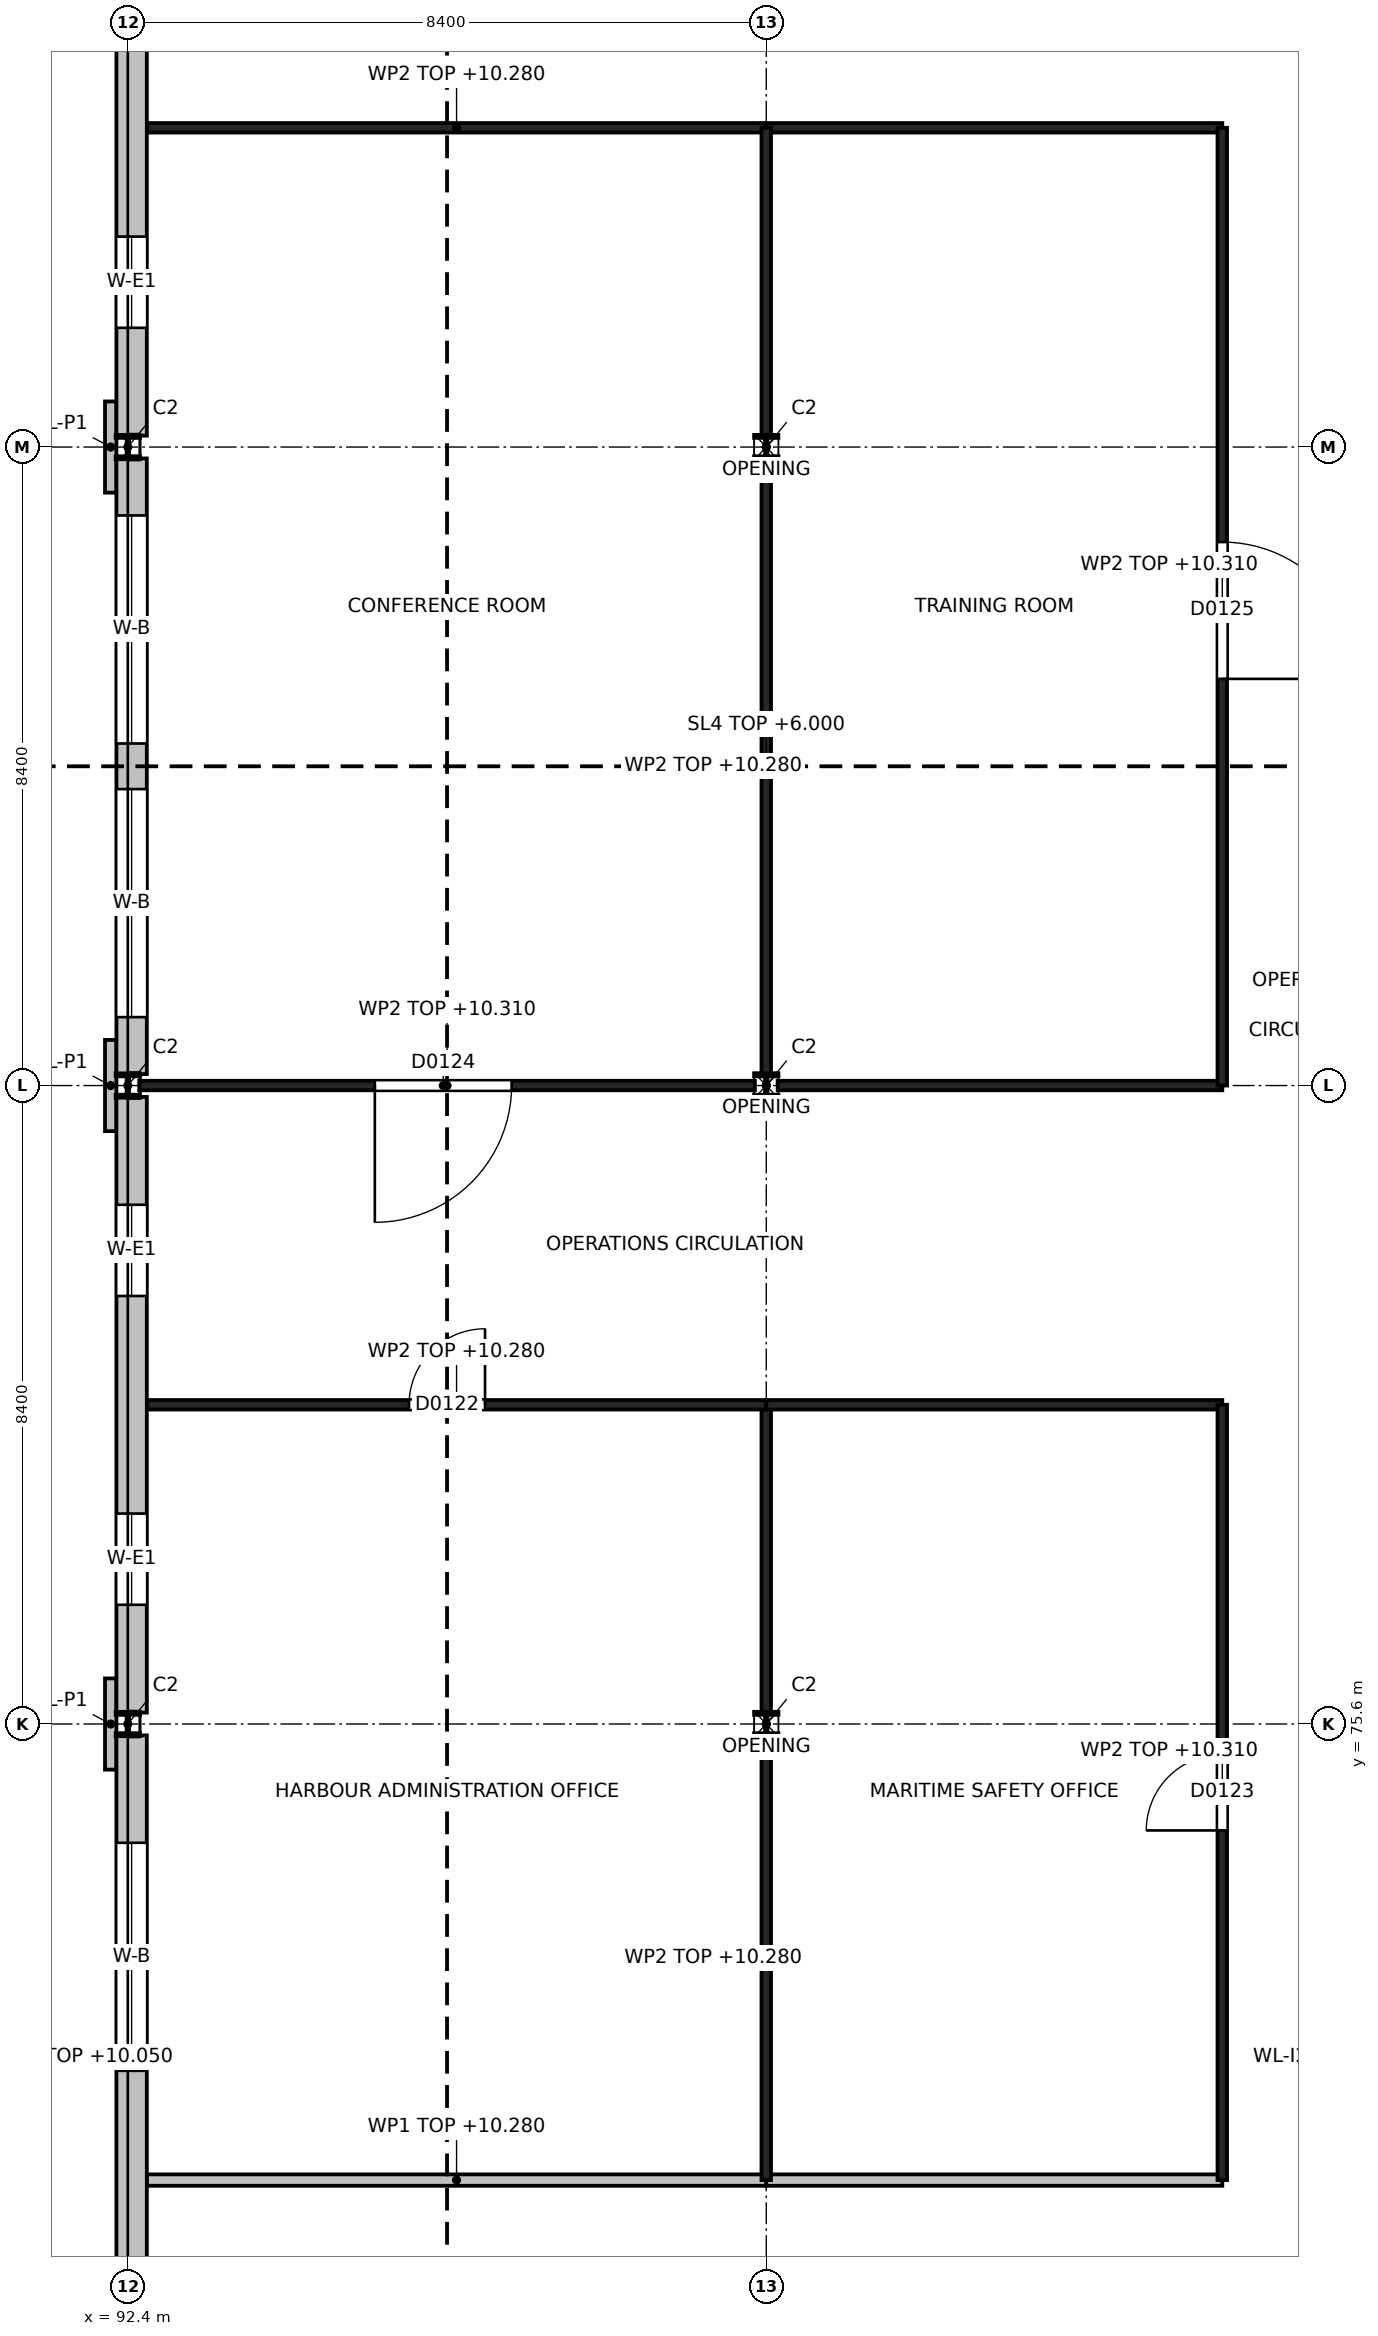
"""IFC4 building model, lengths in metres.
Left out: names, types, materials, properties, quantities, classifications, styles, units other than length and angle.
Written with IfcOpenShell. Run it as: python <this file> out.ifc"""

import sys

from ifc_helpers import new_model, si_unit, direction, frame, frame_2d, origin, origin_2d, place, context, subcontext, project, spatial, rectangle, i_section, extrude, element, fill, save


model = new_model("IFC4")
c1 = context("Model", 3, precision=1e-05, world=origin(), true_north=direction((0.0, 1.0)))
c2 = subcontext(c1, "Body", "Model", "MODEL_VIEW")
j1 = project(units=[si_unit("LENGTHUNIT", "METRE"), si_unit("PLANEANGLEUNIT", "RADIAN")], contexts=[c1])
p1 = place(None, origin())
s1 = spatial("IfcSite", under=j1, at=p1, CompositionType="ELEMENT")
p2 = place(p1, origin())
s2 = spatial("IfcBuilding", under=s1, at=p2, CompositionType="ELEMENT")
p3 = place(p2, frame((0.0, 0.0, 6.0)))
s3 = spatial("IfcBuildingStorey", under=s2, at=p3, CompositionType="ELEMENT", Elevation=6.0)
for number, where, z_axis, x_axis in (
    (1, (92.4, 75.6, 0.0), (0.0, 0.0, 1.0), (1.0, 0.0, 0.0)),
    (2, (92.4, 84.0, 0.0), (0.0, 0.0, 1.0), (1.0, 0.0, 0.0)),
    (3, (92.4, 92.4, 0.0), (0.0, 0.0, 1.0), (1.0, 0.0, 0.0)),
    (4, (100.8, 75.6, 0.0), (0.0, 0.0, 1.0), (1.0, 0.0, 0.0)),
    (5, (100.8, 84.0, 0.0), (0.0, 0.0, 1.0), (1.0, 0.0, 0.0)),
    (6, (100.8, 92.4, 0.0), (0.0, 0.0, 1.0), (1.0, 0.0, 0.0)),
):
    element("IfcColumn", number, at=place(p3, frame(where, z_axis=z_axis, x_axis=x_axis)), inside=s3, PredefinedType="COLUMN", context=c2, shape_type="SweptSolid", body=[
        extrude(i_section(OverallWidth=0.3, OverallDepth=0.3, WebThickness=0.011, FlangeThickness=0.019, at=origin_2d()), origin(), (0.0, 0.0, 1.0), 4.8),
    ])
p4 = place(p3, frame((92.45, 67.0, 0.0), z_axis=(0.0, 0.0, 1.0), x_axis=(0.0, 1.0, 0.0)))
e7 = element("IfcWall", 7, at=p4, inside=s3, PredefinedType="SOLIDWALL", context=c2, shape_type="SweptSolid", body=[
    extrude(rectangle(XDim=8.45, YDim=0.4, at=frame_2d((4.225, 0.0))), origin(), (0.0, 0.0, 1.0), 4.05),
])
p5 = place(p4, frame((4.038, 0.0, 0.9)))
e8 = element("IfcOpeningElement", 8, at=p5, cuts=e7, PredefinedType="OPENING", context=c2, shape_type="SweptSolid", body=[
    extrude(rectangle(XDim=3.0, YDim=3.0, at=frame_2d((1.5, 1.5))), frame((0.0, 0.2, 0.0), z_axis=(0.0, -1.0, 0.0), x_axis=(1.0, 0.0, 0.0)), (0.0, 0.0, 1.0), 0.4),
])
p6 = place(p3, frame((92.45, 75.75, 0.0), z_axis=(0.0, 0.0, 1.0), x_axis=(0.0, 1.0, 0.0)))
e9 = element("IfcWall", 9, at=p6, inside=s3, PredefinedType="SOLIDWALL", context=c2, shape_type="SweptSolid", body=[
    extrude(rectangle(XDim=8.1, YDim=0.4, at=frame_2d((4.05, 0.0))), origin(), (0.0, 0.0, 1.0), 4.05),
])
p7 = place(p6, frame((1.419, 0.0, 0.9)))
e10 = element("IfcOpeningElement", 10, at=p7, cuts=e9, PredefinedType="OPENING", context=c2, shape_type="SweptSolid", body=[
    extrude(rectangle(XDim=1.2, YDim=3.0, at=frame_2d((0.6, 1.5))), frame((0.0, 0.2, 0.0), z_axis=(0.0, -1.0, 0.0), x_axis=(1.0, 0.0, 0.0)), (0.0, 0.0, 1.0), 0.4),
])
p8 = place(p6, frame((5.481, 0.0, 0.9)))
e11 = element("IfcOpeningElement", 11, at=p8, cuts=e9, PredefinedType="OPENING", context=c2, shape_type="SweptSolid", body=[
    extrude(rectangle(XDim=1.2, YDim=3.0, at=frame_2d((0.6, 1.5))), frame((0.0, 0.2, 0.0), z_axis=(0.0, -1.0, 0.0), x_axis=(1.0, 0.0, 0.0)), (0.0, 0.0, 1.0), 0.4),
])
p9 = place(p3, frame((92.45, 84.15, 0.0), z_axis=(0.0, 0.0, 1.0), x_axis=(0.0, 1.0, 0.0)))
e12 = element("IfcWall", 12, at=p9, inside=s3, PredefinedType="SOLIDWALL", context=c2, shape_type="SweptSolid", body=[
    extrude(rectangle(XDim=8.1, YDim=0.4, at=frame_2d((4.05, 0.0))), origin(), (0.0, 0.0, 1.0), 4.05),
])
p10 = place(p9, frame((0.75, 0.0, 0.9)))
e13 = element("IfcOpeningElement", 13, at=p10, cuts=e12, PredefinedType="OPENING", context=c2, shape_type="SweptSolid", body=[
    extrude(rectangle(XDim=3.0, YDim=3.0, at=frame_2d((1.5, 1.5))), frame((0.0, 0.2, 0.0), z_axis=(0.0, -1.0, 0.0), x_axis=(1.0, 0.0, 0.0)), (0.0, 0.0, 1.0), 0.4),
])
p11 = place(p9, frame((4.35, 0.0, 0.9)))
e14 = element("IfcOpeningElement", 14, at=p11, cuts=e12, PredefinedType="OPENING", context=c2, shape_type="SweptSolid", body=[
    extrude(rectangle(XDim=3.0, YDim=3.0, at=frame_2d((1.5, 1.5))), frame((0.0, 0.2, 0.0), z_axis=(0.0, -1.0, 0.0), x_axis=(1.0, 0.0, 0.0)), (0.0, 0.0, 1.0), 0.4),
])
p12 = place(p3, frame((92.45, 92.55, 0.0), z_axis=(0.0, 0.0, 1.0), x_axis=(0.0, 1.0, 0.0)))
e15 = element("IfcWall", 15, at=p12, inside=s3, PredefinedType="SOLIDWALL", context=c2, shape_type="SweptSolid", body=[
    extrude(rectangle(XDim=8.45, YDim=0.4, at=frame_2d((4.225, 0.0))), origin(), (0.0, 0.0, 1.0), 4.05),
])
p13 = place(p12, frame((1.419, 0.0, 0.9)))
e16 = element("IfcOpeningElement", 16, at=p13, cuts=e15, PredefinedType="OPENING", context=c2, shape_type="SweptSolid", body=[
    extrude(rectangle(XDim=1.2, YDim=3.0, at=frame_2d((0.6, 1.5))), frame((0.0, 0.2, 0.0), z_axis=(0.0, -1.0, 0.0), x_axis=(1.0, 0.0, 0.0)), (0.0, 0.0, 1.0), 0.4),
])
p14 = place(p12, frame((5.481, 0.0, 0.9)))
e17 = element("IfcOpeningElement", 17, at=p14, cuts=e15, PredefinedType="OPENING", context=c2, shape_type="SweptSolid", body=[
    extrude(rectangle(XDim=1.2, YDim=3.0, at=frame_2d((0.6, 1.5))), frame((0.0, 0.2, 0.0), z_axis=(0.0, -1.0, 0.0), x_axis=(1.0, 0.0, 0.0)), (0.0, 0.0, 1.0), 0.4),
])
p15 = place(p3, frame((92.175, 75.0, 0.0), z_axis=(0.0, 0.0, 1.0), x_axis=(0.0, 1.0, 0.0)))
e18 = element("IfcWall", 18, at=p15, inside=s3, PredefinedType="SOLIDWALL", context=c2, shape_type="SweptSolid", body=[
    extrude(rectangle(XDim=1.2, YDim=0.15, at=frame_2d((0.6, 0.0))), origin(), (0.0, 0.0, 1.0), 4.8),
])
p16 = place(p3, frame((92.175, 83.4, 0.0), z_axis=(0.0, 0.0, 1.0), x_axis=(0.0, 1.0, 0.0)))
e19 = element("IfcWall", 19, at=p16, inside=s3, PredefinedType="SOLIDWALL", context=c2, shape_type="SweptSolid", body=[
    extrude(rectangle(XDim=1.2, YDim=0.15, at=frame_2d((0.6, 0.0))), origin(), (0.0, 0.0, 1.0), 4.8),
])
p17 = place(p3, frame((92.175, 91.8, 0.0), z_axis=(0.0, 0.0, 1.0), x_axis=(0.0, 1.0, 0.0)))
e20 = element("IfcWall", 20, at=p17, inside=s3, PredefinedType="SOLIDWALL", context=c2, shape_type="SweptSolid", body=[
    extrude(rectangle(XDim=1.2, YDim=0.15, at=frame_2d((0.6, 0.0))), origin(), (0.0, 0.0, 1.0), 4.8),
])
p18 = place(p3, frame((92.65, 69.6, 0.0), z_axis=(0.0, 0.0, 1.0), x_axis=(1.0, 0.0, 0.0)))
e21 = element("IfcWall", 21, at=p18, inside=s3, PredefinedType="PARTITIONING", context=c2, shape_type="SweptSolid", body=[
    extrude(rectangle(XDim=8.15, YDim=0.15, at=frame_2d((4.075, 0.0))), origin(), (0.0, 0.0, 1.0), 4.28),
])
p19 = place(p3, frame((100.8, 69.6, 0.0), z_axis=(0.0, 0.0, 1.0), x_axis=(1.0, 0.0, 0.0)))
e22 = element("IfcWall", 22, at=p19, inside=s3, PredefinedType="PARTITIONING", context=c2, shape_type="SweptSolid", body=[
    extrude(rectangle(XDim=6.0, YDim=0.15, at=frame_2d((3.0, 0.0))), origin(), (0.0, 0.0, 1.0), 4.28),
])
p20 = place(p3, frame((100.8, 69.6, 0.0), z_axis=(0.0, 0.0, 1.0), x_axis=(0.0, 1.0, 0.0)))
e23 = element("IfcWall", 23, at=p20, inside=s3, PredefinedType="PARTITIONING", context=c2, shape_type="SweptSolid", body=[
    extrude(rectangle(XDim=5.85, YDim=0.125, at=frame_2d((2.925, 0.0))), origin(), (0.0, 0.0, 1.0), 4.28),
])
p21 = place(p3, frame((100.8, 75.75, 0.0), z_axis=(0.0, 0.0, 1.0), x_axis=(0.0, 1.0, 0.0)))
e24 = element("IfcWall", 24, at=p21, inside=s3, PredefinedType="PARTITIONING", context=c2, shape_type="SweptSolid", body=[
    extrude(rectangle(XDim=4.05, YDim=0.125, at=frame_2d((2.025, 0.0))), origin(), (0.0, 0.0, 1.0), 4.28),
])
p22 = place(p3, frame((92.65, 79.8, 0.0), z_axis=(0.0, 0.0, 1.0), x_axis=(1.0, 0.0, 0.0)))
e25 = element("IfcWall", 25, at=p22, inside=s3, PredefinedType="PARTITIONING", context=c2, shape_type="SweptSolid", body=[
    extrude(rectangle(XDim=8.15, YDim=0.125, at=frame_2d((4.075, 0.0))), origin(), (0.0, 0.0, 1.0), 4.28),
])
p23 = place(p22, frame((3.449, 0.0, 0.0)))
e26 = element("IfcOpeningElement", 26, at=p23, cuts=e25, PredefinedType="OPENING", context=c2, shape_type="SweptSolid", body=[
    extrude(rectangle(XDim=1.0, YDim=2.2, at=frame_2d((0.5, 1.1))), frame((0.0, 0.062, 0.0), z_axis=(0.0, -1.0, 0.0), x_axis=(1.0, 0.0, 0.0)), (0.0, 0.0, 1.0), 0.125),
])
p24 = place(p3, frame((100.8, 79.8, 0.0), z_axis=(0.0, 0.0, 1.0), x_axis=(1.0, 0.0, 0.0)))
e27 = element("IfcWall", 27, at=p24, inside=s3, PredefinedType="PARTITIONING", context=c2, shape_type="SweptSolid", body=[
    extrude(rectangle(XDim=6.0, YDim=0.125, at=frame_2d((3.0, 0.0))), origin(), (0.0, 0.0, 1.0), 4.28),
])
p25 = place(p3, frame((106.8, 69.6, 0.0), z_axis=(0.0, 0.0, 1.0), x_axis=(0.0, 1.0, 0.0)))
e28 = element("IfcWall", 28, at=p25, inside=s3, PredefinedType="PARTITIONING", context=c2, shape_type="SweptSolid", body=[
    extrude(rectangle(XDim=10.2, YDim=0.125, at=frame_2d((5.1, 0.0))), origin(), (0.0, 0.0, 1.0), 4.31),
])
p26 = place(p25, frame((4.6, 0.0, 0.0)))
e29 = element("IfcOpeningElement", 29, at=p26, cuts=e28, PredefinedType="OPENING", context=c2, shape_type="SweptSolid", body=[
    extrude(rectangle(XDim=1.0, YDim=2.2, at=frame_2d((0.5, 1.1))), frame((0.0, 0.062, 0.0), z_axis=(0.0, -1.0, 0.0), x_axis=(1.0, 0.0, 0.0)), (0.0, 0.0, 1.0), 0.125),
])
p27 = place(p3, frame((92.55, 84.0, 0.0), z_axis=(0.0, 0.0, 1.0), x_axis=(1.0, 0.0, 0.0)))
e30 = element("IfcWall", 30, at=p27, inside=s3, PredefinedType="PARTITIONING", context=c2, shape_type="SweptSolid", body=[
    extrude(rectangle(XDim=8.1, YDim=0.125, at=frame_2d((4.05, 0.0))), origin(), (0.0, 0.0, 1.0), 4.31),
])
p28 = place(p27, frame((3.1, 0.0, 0.0)))
e31 = element("IfcOpeningElement", 31, at=p28, cuts=e30, PredefinedType="OPENING", context=c2, shape_type="SweptSolid", body=[
    extrude(rectangle(XDim=1.8, YDim=2.1, at=frame_2d((0.9, 1.05))), frame((0.0, 0.062, 0.0), z_axis=(0.0, -1.0, 0.0), x_axis=(1.0, 0.0, 0.0)), (0.0, 0.0, 1.0), 0.125),
])
p29 = place(p3, frame((92.65, 96.6, 0.0), z_axis=(0.0, 0.0, 1.0), x_axis=(1.0, 0.0, 0.0)))
e32 = element("IfcWall", 32, at=p29, inside=s3, PredefinedType="PARTITIONING", context=c2, shape_type="SweptSolid", body=[
    extrude(rectangle(XDim=8.15, YDim=0.125, at=frame_2d((4.075, 0.0))), origin(), (0.0, 0.0, 1.0), 4.28),
])
p30 = place(p3, frame((100.95, 84.0, 0.0), z_axis=(0.0, 0.0, 1.0), x_axis=(1.0, 0.0, 0.0)))
e33 = element("IfcWall", 33, at=p30, inside=s3, PredefinedType="PARTITIONING", context=c2, shape_type="SweptSolid", body=[
    extrude(rectangle(XDim=5.85, YDim=0.125, at=frame_2d((2.925, 0.0))), origin(), (0.0, 0.0, 1.0), 4.31),
])
p31 = place(p3, frame((100.8, 96.6, 0.0), z_axis=(0.0, 0.0, 1.0), x_axis=(1.0, 0.0, 0.0)))
e34 = element("IfcWall", 34, at=p31, inside=s3, PredefinedType="PARTITIONING", context=c2, shape_type="SweptSolid", body=[
    extrude(rectangle(XDim=6.0, YDim=0.125, at=frame_2d((3.0, 0.0))), origin(), (0.0, 0.0, 1.0), 4.28),
])
p32 = place(p3, frame((106.8, 84.0, 0.0), z_axis=(0.0, 0.0, 1.0), x_axis=(0.0, 1.0, 0.0)))
e35 = element("IfcWall", 35, at=p32, inside=s3, PredefinedType="PARTITIONING", context=c2, shape_type="SweptSolid", body=[
    extrude(rectangle(XDim=12.6, YDim=0.125, at=frame_2d((6.3, 0.0))), origin(), (0.0, 0.0, 1.0), 4.31),
])
p33 = place(p32, frame((5.35, 0.0, 0.0)))
e36 = element("IfcOpeningElement", 36, at=p33, cuts=e35, PredefinedType="OPENING", context=c2, shape_type="SweptSolid", body=[
    extrude(rectangle(XDim=1.8, YDim=2.1, at=frame_2d((0.9, 1.05))), frame((0.0, 0.062, 0.0), z_axis=(0.0, -1.0, 0.0), x_axis=(1.0, 0.0, 0.0)), (0.0, 0.0, 1.0), 0.125),
])
p34 = place(p3, frame((100.8, 84.15, 0.0), z_axis=(0.0, 0.0, 1.0), x_axis=(0.0, 1.0, 0.0)))
e37 = element("IfcWall", 37, at=p34, inside=s3, PredefinedType="PARTITIONING", context=c2, shape_type="SweptSolid", body=[
    extrude(rectangle(XDim=8.1, YDim=0.125, at=frame_2d((4.05, 0.0))), origin(), (0.0, 0.0, 1.0), 4.28),
])
p35 = place(p3, frame((100.8, 92.55, 0.0), z_axis=(0.0, 0.0, 1.0), x_axis=(0.0, 1.0, 0.0)))
e38 = element("IfcWall", 38, at=p35, inside=s3, PredefinedType="PARTITIONING", context=c2, shape_type="SweptSolid", body=[
    extrude(rectangle(XDim=4.05, YDim=0.125, at=frame_2d((2.025, 0.0))), origin(), (0.0, 0.0, 1.0), 4.28),
])
p36 = place(p5, origin())
e39 = element("IfcWindow", 39, at=p36, inside=s3, PartitioningType="SINGLE_PANEL", PredefinedType="WINDOW", context=c2, shape_type="SweptSolid", body=[
    extrude(rectangle(XDim=3.0, YDim=3.0, at=frame_2d((1.5, 1.5))), frame((0.0, 0.03, 0.0), z_axis=(0.0, -1.0, 0.0), x_axis=(1.0, 0.0, 0.0)), (0.0, 0.0, 1.0), 0.06),
])
fill(e8, e39)
p37 = place(p7, origin())
e40 = element("IfcWindow", 40, at=p37, inside=s3, PartitioningType="SINGLE_PANEL", PredefinedType="WINDOW", context=c2, shape_type="SweptSolid", body=[
    extrude(rectangle(XDim=1.2, YDim=3.0, at=frame_2d((0.6, 1.5))), frame((0.0, 0.03, 0.0), z_axis=(0.0, -1.0, 0.0), x_axis=(1.0, 0.0, 0.0)), (0.0, 0.0, 1.0), 0.06),
])
fill(e10, e40)
p38 = place(p8, origin())
e41 = element("IfcWindow", 41, at=p38, inside=s3, PartitioningType="SINGLE_PANEL", PredefinedType="WINDOW", context=c2, shape_type="SweptSolid", body=[
    extrude(rectangle(XDim=1.2, YDim=3.0, at=frame_2d((0.6, 1.5))), frame((0.0, 0.03, 0.0), z_axis=(0.0, -1.0, 0.0), x_axis=(1.0, 0.0, 0.0)), (0.0, 0.0, 1.0), 0.06),
])
fill(e11, e41)
p39 = place(p10, origin())
e42 = element("IfcWindow", 42, at=p39, inside=s3, PartitioningType="SINGLE_PANEL", PredefinedType="WINDOW", context=c2, shape_type="SweptSolid", body=[
    extrude(rectangle(XDim=3.0, YDim=3.0, at=frame_2d((1.5, 1.5))), frame((0.0, 0.03, 0.0), z_axis=(0.0, -1.0, 0.0), x_axis=(1.0, 0.0, 0.0)), (0.0, 0.0, 1.0), 0.06),
])
fill(e13, e42)
p40 = place(p11, origin())
e43 = element("IfcWindow", 43, at=p40, inside=s3, PartitioningType="SINGLE_PANEL", PredefinedType="WINDOW", context=c2, shape_type="SweptSolid", body=[
    extrude(rectangle(XDim=3.0, YDim=3.0, at=frame_2d((1.5, 1.5))), frame((0.0, 0.03, 0.0), z_axis=(0.0, -1.0, 0.0), x_axis=(1.0, 0.0, 0.0)), (0.0, 0.0, 1.0), 0.06),
])
fill(e14, e43)
p41 = place(p13, origin())
e44 = element("IfcWindow", 44, at=p41, inside=s3, PartitioningType="SINGLE_PANEL", PredefinedType="WINDOW", context=c2, shape_type="SweptSolid", body=[
    extrude(rectangle(XDim=1.2, YDim=3.0, at=frame_2d((0.6, 1.5))), frame((0.0, 0.03, 0.0), z_axis=(0.0, -1.0, 0.0), x_axis=(1.0, 0.0, 0.0)), (0.0, 0.0, 1.0), 0.06),
])
fill(e16, e44)
p42 = place(p23, origin())
e45 = element("IfcDoor", 45, at=p42, inside=s3, OperationType="SINGLE_SWING_RIGHT", PredefinedType="DOOR", context=c2, shape_type="SweptSolid", body=[
    extrude(rectangle(XDim=1.0, YDim=2.2, at=frame_2d((0.5, 1.1))), frame((0.0, 0.025, 0.0), z_axis=(0.0, -1.0, 0.0), x_axis=(1.0, 0.0, 0.0)), (0.0, 0.0, 1.0), 0.05),
])
fill(e26, e45)
p43 = place(p26, origin())
e46 = element("IfcDoor", 46, at=p43, inside=s3, OperationType="SINGLE_SWING_LEFT", PredefinedType="DOOR", context=c2, shape_type="SweptSolid", body=[
    extrude(rectangle(XDim=1.0, YDim=2.2, at=frame_2d((0.5, 1.1))), frame((0.0, 0.025, 0.0), z_axis=(0.0, -1.0, 0.0), x_axis=(1.0, 0.0, 0.0)), (0.0, 0.0, 1.0), 0.05),
])
fill(e29, e46)
p44 = place(p28, origin())
e47 = element("IfcDoor", 47, at=p44, inside=s3, OperationType="DOUBLE_DOOR_DOUBLE_SWING", PredefinedType="DOOR", context=c2, shape_type="SweptSolid", body=[
    extrude(rectangle(XDim=1.8, YDim=2.1, at=frame_2d((0.9, 1.05))), frame((0.0, 0.025, 0.0), z_axis=(0.0, -1.0, 0.0), x_axis=(1.0, 0.0, 0.0)), (0.0, 0.0, 1.0), 0.05),
])
fill(e31, e47)
p45 = place(p33, origin())
e48 = element("IfcDoor", 48, at=p45, inside=s3, OperationType="DOUBLE_DOOR_DOUBLE_SWING", PredefinedType="DOOR", context=c2, shape_type="SweptSolid", body=[
    extrude(rectangle(XDim=1.8, YDim=2.1, at=frame_2d((0.9, 1.05))), frame((0.0, 0.025, 0.0), z_axis=(0.0, -1.0, 0.0), x_axis=(1.0, 0.0, 0.0)), (0.0, 0.0, 1.0), 0.05),
])
fill(e36, e48)
save(model, sys.argv[1])
